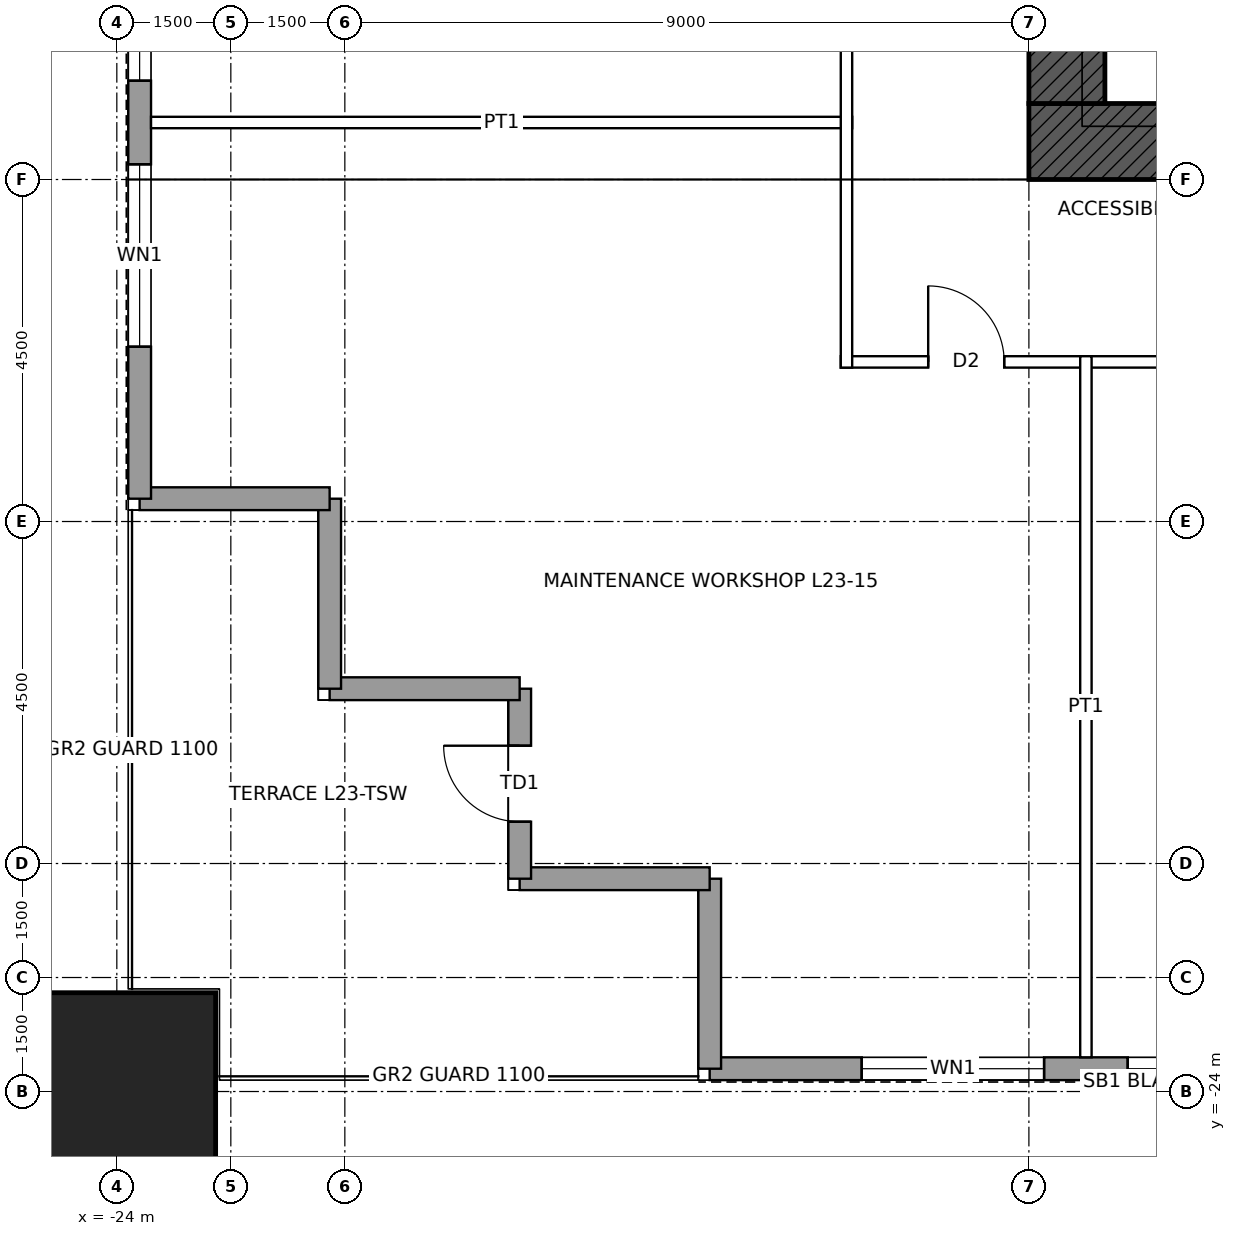
"""IFC4 building model, lengths in metres.
Left out: names, types, materials, properties, quantities, classifications, styles, units other than length and angle.
Written with IfcOpenShell. Run it as: python <this file> out.ifc"""

import sys

from ifc_helpers import new_model, si_unit, direction, frame, frame_2d, origin, origin_2d, place, context, subcontext, project, spatial, rectangle, hollow_rectangle, extrude, element, fill, save


model = new_model("IFC4")
c1 = context("Model", 3, precision=1e-05, world=origin(), true_north=direction((0.0, 1.0)))
c2 = subcontext(c1, "Body", "Model", "MODEL_VIEW")
j1 = project(units=[si_unit("LENGTHUNIT", "METRE"), si_unit("PLANEANGLEUNIT", "RADIAN")], contexts=[c1])
p1 = place(None, origin())
s1 = spatial("IfcSite", under=j1, at=p1, CompositionType="ELEMENT")
p2 = place(p1, origin())
s2 = spatial("IfcBuilding", under=s1, at=p2, CompositionType="ELEMENT")
p3 = place(p2, frame((0.0, 0.0, 117.9)))
s3 = spatial("IfcBuildingStorey", under=s2, at=p3, CompositionType="ELEMENT", Elevation=117.9)
p4 = place(p3, frame((-24.0, -24.0, 0.0), z_axis=(0.0, 0.0, 1.0), x_axis=(1.0, 0.0, 0.0)))
e1 = element("IfcColumn", 1, at=p4, inside=s3, PredefinedType="COLUMN", context=c2, shape_type="SweptSolid", body=[
    extrude(hollow_rectangle(XDim=2.6, YDim=2.6, WallThickness=0.13, at=origin_2d()), origin(), (0.0, 0.0, 1.0), 4.5),
])
p5 = place(p3, frame((12.0, -11.5, 0.0), z_axis=(0.0, 0.0, 1.0), x_axis=(-1.0, 0.0, 0.0)))
e2 = element("IfcWall", 2, at=p5, inside=s3, PredefinedType="SHEAR", context=c2, shape_type="SweptSolid", body=[
    extrude(rectangle(XDim=24.0, YDim=1.0, at=frame_2d((12.0, 0.0))), origin(), (0.0, 0.0, 1.0), 4.5),
])
p6 = place(p5, frame((11.5, 0.0, 0.0)))
e3 = element("IfcOpeningElement", 3, at=p6, cuts=e2, PredefinedType="OPENING", context=c2, shape_type="SweptSolid", body=[
    extrude(rectangle(XDim=1.0, YDim=2.1, at=frame_2d((0.5, 1.05))), frame((0.0, 0.51, 0.0), z_axis=(0.0, -1.0, 0.0), x_axis=(1.0, 0.0, 0.0)), (0.0, 0.0, 1.0), 1.02),
])
p7 = place(p5, frame((1.0, 0.0, 0.0)))
e4 = element("IfcOpeningElement", 4, at=p7, cuts=e2, PredefinedType="OPENING", context=c2, shape_type="SweptSolid", body=[
    extrude(rectangle(XDim=1.0, YDim=2.4, at=frame_2d((0.5, 1.2))), frame((0.0, 0.51, 0.0), z_axis=(0.0, -1.0, 0.0), x_axis=(1.0, 0.0, 0.0)), (0.0, 0.0, 1.0), 1.02),
])
p8 = place(p3, frame((-11.5, -11.0, 0.0), z_axis=(0.0, 0.0, 1.0), x_axis=(0.0, 1.0, 0.0)))
e5 = element("IfcWall", 5, at=p8, inside=s3, PredefinedType="SHEAR", context=c2, shape_type="SweptSolid", body=[
    extrude(rectangle(XDim=22.0, YDim=1.0, at=frame_2d((11.0, 0.0))), origin(), (0.0, 0.0, 1.0), 4.5),
])
p9 = place(p8, frame((10.5, 0.0, 0.0)))
e6 = element("IfcOpeningElement", 6, at=p9, cuts=e5, PredefinedType="OPENING", context=c2, shape_type="SweptSolid", body=[
    extrude(rectangle(XDim=1.0, YDim=2.4, at=frame_2d((0.5, 1.2))), frame((0.0, 0.51, 0.0), z_axis=(0.0, -1.0, 0.0), x_axis=(1.0, 0.0, 0.0)), (0.0, 0.0, 1.0), 1.02),
])
p10 = place(p3, frame((16.2, -23.7, 0.0), z_axis=(0.0, 0.0, 1.0), x_axis=(-1.0, 0.0, 0.0)))
e7 = element("IfcWall", 7, at=p10, inside=s3, PredefinedType="SOLIDWALL", context=c2, shape_type="SweptSolid", body=[
    extrude(rectangle(XDim=32.4, YDim=0.3, at=frame_2d((16.2, 0.0))), origin(), (0.0, 0.0, 1.0), 4.3),
])
p11 = place(p10, frame((2.0, 0.0, 1.0)))
e8 = element("IfcOpeningElement", 8, at=p11, cuts=e7, PredefinedType="OPENING", context=c2, shape_type="SweptSolid", body=[
    extrude(rectangle(XDim=2.4, YDim=1.2, at=frame_2d((1.2, 0.6))), frame((0.0, 0.16, 0.0), z_axis=(0.0, -1.0, 0.0), x_axis=(1.0, 0.0, 0.0)), (0.0, 0.0, 1.0), 0.32),
])
p12 = place(p10, frame((5.45, 0.0, 1.0)))
e9 = element("IfcOpeningElement", 9, at=p12, cuts=e7, PredefinedType="OPENING", context=c2, shape_type="SweptSolid", body=[
    extrude(rectangle(XDim=2.4, YDim=1.2, at=frame_2d((1.2, 0.6))), frame((0.0, 0.16, 0.0), z_axis=(0.0, -1.0, 0.0), x_axis=(1.0, 0.0, 0.0)), (0.0, 0.0, 1.0), 0.32),
])
p13 = place(p10, frame((8.15, 0.0, 1.0)))
e10 = element("IfcOpeningElement", 10, at=p13, cuts=e7, PredefinedType="OPENING", context=c2, shape_type="SweptSolid", body=[
    extrude(rectangle(XDim=1.8, YDim=1.2, at=frame_2d((0.9, 0.6))), frame((0.0, 0.16, 0.0), z_axis=(0.0, -1.0, 0.0), x_axis=(1.0, 0.0, 0.0)), (0.0, 0.0, 1.0), 0.32),
])
p14 = place(p10, frame((10.25, 0.0, 1.0)))
e11 = element("IfcOpeningElement", 11, at=p14, cuts=e7, PredefinedType="OPENING", context=c2, shape_type="SweptSolid", body=[
    extrude(rectangle(XDim=1.8, YDim=1.2, at=frame_2d((0.9, 0.6))), frame((0.0, 0.16, 0.0), z_axis=(0.0, -1.0, 0.0), x_axis=(1.0, 0.0, 0.0)), (0.0, 0.0, 1.0), 0.32),
])
p15 = place(p10, frame((15.6, 0.0, 1.0)))
e12 = element("IfcOpeningElement", 12, at=p15, cuts=e7, PredefinedType="OPENING", context=c2, shape_type="SweptSolid", body=[
    extrude(rectangle(XDim=1.8, YDim=1.2, at=frame_2d((0.9, 0.6))), frame((0.0, 0.16, 0.0), z_axis=(0.0, -1.0, 0.0), x_axis=(1.0, 0.0, 0.0)), (0.0, 0.0, 1.0), 0.32),
])
p16 = place(p10, frame((20.5, 0.0, 1.0)))
e13 = element("IfcOpeningElement", 13, at=p16, cuts=e7, PredefinedType="OPENING", context=c2, shape_type="SweptSolid", body=[
    extrude(rectangle(XDim=2.4, YDim=1.2, at=frame_2d((1.2, 0.6))), frame((0.0, 0.16, 0.0), z_axis=(0.0, -1.0, 0.0), x_axis=(1.0, 0.0, 0.0)), (0.0, 0.0, 1.0), 0.32),
])
p17 = place(p10, frame((24.5, 0.0, 1.0)))
e14 = element("IfcOpeningElement", 14, at=p17, cuts=e7, PredefinedType="OPENING", context=c2, shape_type="SweptSolid", body=[
    extrude(rectangle(XDim=2.4, YDim=1.2, at=frame_2d((1.2, 0.6))), frame((0.0, 0.16, 0.0), z_axis=(0.0, -1.0, 0.0), x_axis=(1.0, 0.0, 0.0)), (0.0, 0.0, 1.0), 0.32),
])
p18 = place(p10, frame((28.0, 0.0, 1.0)))
e15 = element("IfcOpeningElement", 15, at=p18, cuts=e7, PredefinedType="OPENING", context=c2, shape_type="SweptSolid", body=[
    extrude(rectangle(XDim=2.4, YDim=1.2, at=frame_2d((1.2, 0.6))), frame((0.0, 0.16, 0.0), z_axis=(0.0, -1.0, 0.0), x_axis=(1.0, 0.0, 0.0)), (0.0, 0.0, 1.0), 0.32),
])
for number, where, z_axis, x_axis in (
    (16, (-16.2, -23.7, 0.0), (0.0, 0.0, 1.0), (0.0, 1.0, 0.0)),
    (17, (-16.2, -21.2, 0.0), (0.0, 0.0, 1.0), (-1.0, 0.0, 0.0)),
):
    element("IfcWall", number, at=place(p3, frame(where, z_axis=z_axis, x_axis=x_axis)), inside=s3, PredefinedType="SOLIDWALL", context=c2, shape_type="SweptSolid", body=[
        extrude(rectangle(XDim=2.5, YDim=0.3, at=frame_2d((1.25, 0.0))), origin(), (0.0, 0.0, 1.0), 4.3),
    ])
p19 = place(p3, frame((-18.7, -21.2, 0.0), z_axis=(0.0, 0.0, 1.0), x_axis=(0.0, 1.0, 0.0)))
e18 = element("IfcWall", 18, at=p19, inside=s3, PredefinedType="SOLIDWALL", context=c2, shape_type="SweptSolid", body=[
    extrude(rectangle(XDim=2.5, YDim=0.3, at=frame_2d((1.25, 0.0))), origin(), (0.0, 0.0, 1.0), 4.3),
])
p20 = place(p19, frame((0.75, 0.0, 0.0)))
e19 = element("IfcOpeningElement", 19, at=p20, cuts=e18, PredefinedType="OPENING", context=c2, shape_type="SweptSolid", body=[
    extrude(rectangle(XDim=1.0, YDim=2.4, at=frame_2d((0.5, 1.2))), frame((0.0, 0.16, 0.0), z_axis=(0.0, -1.0, 0.0), x_axis=(1.0, 0.0, 0.0)), (0.0, 0.0, 1.0), 0.32),
])
for number, where, z_axis, x_axis in (
    (20, (-18.7, -18.7, 0.0), (0.0, 0.0, 1.0), (-1.0, 0.0, 0.0)),
    (21, (-21.2, -18.7, 0.0), (0.0, 0.0, 1.0), (0.0, 1.0, 0.0)),
    (22, (-21.2, -16.2, 0.0), (0.0, 0.0, 1.0), (-1.0, 0.0, 0.0)),
):
    element("IfcWall", number, at=place(p3, frame(where, z_axis=z_axis, x_axis=x_axis)), inside=s3, PredefinedType="SOLIDWALL", context=c2, shape_type="SweptSolid", body=[
        extrude(rectangle(XDim=2.5, YDim=0.3, at=frame_2d((1.25, 0.0))), origin(), (0.0, 0.0, 1.0), 4.3),
    ])
p21 = place(p3, frame((-23.7, -16.2, 0.0), z_axis=(0.0, 0.0, 1.0), x_axis=(0.0, 1.0, 0.0)))
e23 = element("IfcWall", 23, at=p21, inside=s3, PredefinedType="SOLIDWALL", context=c2, shape_type="SweptSolid", body=[
    extrude(rectangle(XDim=32.4, YDim=0.3, at=frame_2d((16.2, 0.0))), origin(), (0.0, 0.0, 1.0), 4.3),
])
p22 = place(p21, frame((2.0, 0.0, 1.0)))
e24 = element("IfcOpeningElement", 24, at=p22, cuts=e23, PredefinedType="OPENING", context=c2, shape_type="SweptSolid", body=[
    extrude(rectangle(XDim=2.4, YDim=1.2, at=frame_2d((1.2, 0.6))), frame((0.0, 0.16, 0.0), z_axis=(0.0, -1.0, 0.0), x_axis=(1.0, 0.0, 0.0)), (0.0, 0.0, 1.0), 0.32),
])
p23 = place(p21, frame((5.5, 0.0, 1.0)))
e25 = element("IfcOpeningElement", 25, at=p23, cuts=e23, PredefinedType="OPENING", context=c2, shape_type="SweptSolid", body=[
    extrude(rectangle(XDim=2.4, YDim=1.2, at=frame_2d((1.2, 0.6))), frame((0.0, 0.16, 0.0), z_axis=(0.0, -1.0, 0.0), x_axis=(1.0, 0.0, 0.0)), (0.0, 0.0, 1.0), 0.32),
])
p24 = place(p21, frame((9.5, 0.0, 1.0)))
e26 = element("IfcOpeningElement", 26, at=p24, cuts=e23, PredefinedType="OPENING", context=c2, shape_type="SweptSolid", body=[
    extrude(rectangle(XDim=2.4, YDim=1.2, at=frame_2d((1.2, 0.6))), frame((0.0, 0.16, 0.0), z_axis=(0.0, -1.0, 0.0), x_axis=(1.0, 0.0, 0.0)), (0.0, 0.0, 1.0), 0.32),
])
p25 = place(p21, frame((15.0, 0.0, 1.0)))
e27 = element("IfcOpeningElement", 27, at=p25, cuts=e23, PredefinedType="OPENING", context=c2, shape_type="SweptSolid", body=[
    extrude(rectangle(XDim=1.8, YDim=1.2, at=frame_2d((0.9, 0.6))), frame((0.0, 0.16, 0.0), z_axis=(0.0, -1.0, 0.0), x_axis=(1.0, 0.0, 0.0)), (0.0, 0.0, 1.0), 0.32),
])
p26 = place(p21, frame((20.05, 0.0, 1.0)))
e28 = element("IfcOpeningElement", 28, at=p26, cuts=e23, PredefinedType="OPENING", context=c2, shape_type="SweptSolid", body=[
    extrude(rectangle(XDim=1.8, YDim=1.2, at=frame_2d((0.9, 0.6))), frame((0.0, 0.16, 0.0), z_axis=(0.0, -1.0, 0.0), x_axis=(1.0, 0.0, 0.0)), (0.0, 0.0, 1.0), 0.32),
])
p27 = place(p21, frame((22.15, 0.0, 1.0)))
e29 = element("IfcOpeningElement", 29, at=p27, cuts=e23, PredefinedType="OPENING", context=c2, shape_type="SweptSolid", body=[
    extrude(rectangle(XDim=1.8, YDim=1.2, at=frame_2d((0.9, 0.6))), frame((0.0, 0.16, 0.0), z_axis=(0.0, -1.0, 0.0), x_axis=(1.0, 0.0, 0.0)), (0.0, 0.0, 1.0), 0.32),
])
p28 = place(p21, frame((24.5, 0.0, 1.0)))
e30 = element("IfcOpeningElement", 30, at=p28, cuts=e23, PredefinedType="OPENING", context=c2, shape_type="SweptSolid", body=[
    extrude(rectangle(XDim=2.4, YDim=1.2, at=frame_2d((1.2, 0.6))), frame((0.0, 0.16, 0.0), z_axis=(0.0, -1.0, 0.0), x_axis=(1.0, 0.0, 0.0)), (0.0, 0.0, 1.0), 0.32),
])
p29 = place(p21, frame((28.0, 0.0, 1.0)))
e31 = element("IfcOpeningElement", 31, at=p29, cuts=e23, PredefinedType="OPENING", context=c2, shape_type="SweptSolid", body=[
    extrude(rectangle(XDim=2.4, YDim=1.2, at=frame_2d((1.2, 0.6))), frame((0.0, 0.16, 0.0), z_axis=(0.0, -1.0, 0.0), x_axis=(1.0, 0.0, 0.0)), (0.0, 0.0, 1.0), 0.32),
])
p30 = place(p3, frame((-14.475, -14.4, 0.0), z_axis=(0.0, 0.0, 1.0), x_axis=(1.0, 0.0, 0.0)))
e32 = element("IfcWall", 32, at=p30, inside=s3, PredefinedType="PARTITIONING", context=c2, shape_type="SweptSolid", body=[
    extrude(rectangle(XDim=28.95, YDim=0.15, at=frame_2d((14.475, 0.0))), origin(), (0.0, 0.0, 1.0), 4.3),
])
p31 = place(p30, frame((21.075, 0.0, 0.0)))
e33 = element("IfcOpeningElement", 33, at=p31, cuts=e32, PredefinedType="OPENING", context=c2, shape_type="SweptSolid", body=[
    extrude(rectangle(XDim=1.8, YDim=2.4, at=frame_2d((0.9, 1.2))), frame((0.0, 0.085, 0.0), z_axis=(0.0, -1.0, 0.0), x_axis=(1.0, 0.0, 0.0)), (0.0, 0.0, 1.0), 0.17),
])
p32 = place(p30, frame((13.575, 0.0, 0.0)))
e34 = element("IfcOpeningElement", 34, at=p32, cuts=e32, PredefinedType="OPENING", context=c2, shape_type="SweptSolid", body=[
    extrude(rectangle(XDim=1.8, YDim=2.4, at=frame_2d((0.9, 1.2))), frame((0.0, 0.085, 0.0), z_axis=(0.0, -1.0, 0.0), x_axis=(1.0, 0.0, 0.0)), (0.0, 0.0, 1.0), 0.17),
])
p33 = place(p30, frame((6.475, 0.0, 0.0)))
e35 = element("IfcOpeningElement", 35, at=p33, cuts=e32, PredefinedType="OPENING", context=c2, shape_type="SweptSolid", body=[
    extrude(rectangle(XDim=1.0, YDim=2.1, at=frame_2d((0.5, 1.05))), frame((0.0, 0.085, 0.0), z_axis=(0.0, -1.0, 0.0), x_axis=(1.0, 0.0, 0.0)), (0.0, 0.0, 1.0), 0.17),
])
p34 = place(p30, frame((26.8, 0.0, 0.0)))
e36 = element("IfcOpeningElement", 36, at=p34, cuts=e32, PredefinedType="OPENING", context=c2, shape_type="SweptSolid", body=[
    extrude(rectangle(XDim=1.0, YDim=2.1, at=frame_2d((0.5, 1.05))), frame((0.0, 0.085, 0.0), z_axis=(0.0, -1.0, 0.0), x_axis=(1.0, 0.0, 0.0)), (0.0, 0.0, 1.0), 0.17),
])
p35 = place(p30, frame((1.15, 0.0, 0.0)))
e37 = element("IfcOpeningElement", 37, at=p35, cuts=e32, PredefinedType="OPENING", context=c2, shape_type="SweptSolid", body=[
    extrude(rectangle(XDim=1.0, YDim=2.1, at=frame_2d((0.5, 1.05))), frame((0.0, 0.085, 0.0), z_axis=(0.0, -1.0, 0.0), x_axis=(1.0, 0.0, 0.0)), (0.0, 0.0, 1.0), 0.17),
])
p36 = place(p3, frame((-23.55, -11.25, 0.0), z_axis=(0.0, 0.0, 1.0), x_axis=(1.0, 0.0, 0.0)))
e38 = element("IfcWall", 38, at=p36, inside=s3, PredefinedType="PARTITIONING", context=c2, shape_type="SweptSolid", body=[
    extrude(rectangle(XDim=9.225, YDim=0.15, at=frame_2d((4.613, 0.0))), origin(), (0.0, 0.0, 1.0), 3.431),
])
p37 = place(p3, frame((-14.4, -14.475, 0.0), z_axis=(0.0, 0.0, 1.0), x_axis=(0.0, 1.0, 0.0)))
e39 = element("IfcWall", 39, at=p37, inside=s3, PredefinedType="PARTITIONING", context=c2, shape_type="SweptSolid", body=[
    extrude(rectangle(XDim=28.95, YDim=0.15, at=frame_2d((14.475, 0.0))), origin(), (0.0, 0.0, 1.0), 4.3),
])
p38 = place(p37, frame((6.075, 0.0, 0.0)))
e40 = element("IfcOpeningElement", 40, at=p38, cuts=e39, PredefinedType="OPENING", context=c2, shape_type="SweptSolid", body=[
    extrude(rectangle(XDim=1.8, YDim=2.4, at=frame_2d((0.9, 1.2))), frame((0.0, 0.085, 0.0), z_axis=(0.0, -1.0, 0.0), x_axis=(1.0, 0.0, 0.0)), (0.0, 0.0, 1.0), 0.17),
])
p39 = place(p37, frame((17.325, 0.0, 0.0)))
e41 = element("IfcOpeningElement", 41, at=p39, cuts=e39, PredefinedType="OPENING", context=c2, shape_type="SweptSolid", body=[
    extrude(rectangle(XDim=1.8, YDim=2.4, at=frame_2d((0.9, 1.2))), frame((0.0, 0.085, 0.0), z_axis=(0.0, -1.0, 0.0), x_axis=(1.0, 0.0, 0.0)), (0.0, 0.0, 1.0), 0.17),
])
p40 = place(p3, frame((-11.25, -23.55, 0.0), z_axis=(0.0, 0.0, 1.0), x_axis=(0.0, 1.0, 0.0)))
e42 = element("IfcWall", 42, at=p40, inside=s3, PredefinedType="PARTITIONING", context=c2, shape_type="SweptSolid", body=[
    extrude(rectangle(XDim=9.225, YDim=0.15, at=frame_2d((4.613, 0.0))), origin(), (0.0, 0.0, 1.0), 3.431),
])
p41 = place(p17, origin())
e43 = element("IfcWindow", 43, at=p41, inside=s3, PartitioningType="SINGLE_PANEL", PredefinedType="WINDOW", context=c2, shape_type="SweptSolid", body=[
    extrude(rectangle(XDim=2.4, YDim=1.2, at=frame_2d((1.2, 0.6))), frame((0.0, 0.03, 0.0), z_axis=(0.0, -1.0, 0.0), x_axis=(1.0, 0.0, 0.0)), (0.0, 0.0, 1.0), 0.06),
])
fill(e14, e43)
p42 = place(p18, origin())
e44 = element("IfcWindow", 44, at=p42, inside=s3, PartitioningType="SINGLE_PANEL", PredefinedType="WINDOW", context=c2, shape_type="SweptSolid", body=[
    extrude(rectangle(XDim=2.4, YDim=1.2, at=frame_2d((1.2, 0.6))), frame((0.0, 0.03, 0.0), z_axis=(0.0, -1.0, 0.0), x_axis=(1.0, 0.0, 0.0)), (0.0, 0.0, 1.0), 0.06),
])
fill(e15, e44)
p43 = place(p20, origin())
e45 = element("IfcDoor", 45, at=p43, inside=s3, OperationType="SINGLE_SWING_RIGHT", PredefinedType="DOOR", context=c2, shape_type="SweptSolid", body=[
    extrude(rectangle(XDim=1.0, YDim=2.4, at=frame_2d((0.5, 1.2))), frame((0.0, 0.025, 0.0), z_axis=(0.0, -1.0, 0.0), x_axis=(1.0, 0.0, 0.0)), (0.0, 0.0, 1.0), 0.05),
])
fill(e19, e45)
p44 = place(p22, origin())
e46 = element("IfcWindow", 46, at=p44, inside=s3, PartitioningType="SINGLE_PANEL", PredefinedType="WINDOW", context=c2, shape_type="SweptSolid", body=[
    extrude(rectangle(XDim=2.4, YDim=1.2, at=frame_2d((1.2, 0.6))), frame((0.0, 0.03, 0.0), z_axis=(0.0, -1.0, 0.0), x_axis=(1.0, 0.0, 0.0)), (0.0, 0.0, 1.0), 0.06),
])
fill(e24, e46)
p45 = place(p23, origin())
e47 = element("IfcWindow", 47, at=p45, inside=s3, PartitioningType="SINGLE_PANEL", PredefinedType="WINDOW", context=c2, shape_type="SweptSolid", body=[
    extrude(rectangle(XDim=2.4, YDim=1.2, at=frame_2d((1.2, 0.6))), frame((0.0, 0.03, 0.0), z_axis=(0.0, -1.0, 0.0), x_axis=(1.0, 0.0, 0.0)), (0.0, 0.0, 1.0), 0.06),
])
fill(e25, e47)
p46 = place(p35, origin())
e48 = element("IfcDoor", 48, at=p46, inside=s3, OperationType="SINGLE_SWING_LEFT", PredefinedType="DOOR", context=c2, shape_type="SweptSolid", body=[
    extrude(rectangle(XDim=1.0, YDim=2.1, at=frame_2d((0.5, 1.05))), frame((0.0, 0.025, 0.0), z_axis=(0.0, -1.0, 0.0), x_axis=(1.0, 0.0, 0.0)), (0.0, 0.0, 1.0), 0.05),
])
fill(e37, e48)
save(model, sys.argv[1])
